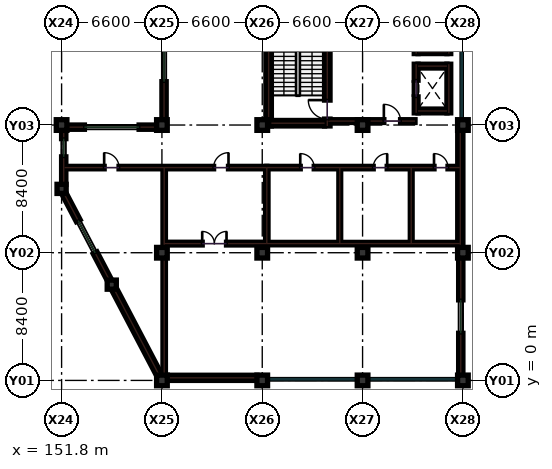
"""IFC4 building model, lengths in metres.
Left out: names, types, materials, properties, quantities, classifications, styles, units other than length and angle.
Written with IfcOpenShell. Run it as: python <this file> out.ifc"""

import sys

from ifc_helpers import new_model, si_unit, direction, frame, frame_2d, origin, origin_2d, place, context, subcontext, project, spatial, rectangle, extrude, element, fill, save


model = new_model("IFC4")
c1 = context("Model", 3, precision=1e-05, world=origin(), true_north=direction((0.0, 1.0)))
c2 = subcontext(c1, "Body", "Model", "MODEL_VIEW")
j1 = project(units=[si_unit("LENGTHUNIT", "METRE"), si_unit("PLANEANGLEUNIT", "RADIAN")], contexts=[c1])
p1 = place(None, origin())
s1 = spatial("IfcSite", under=j1, at=p1, CompositionType="ELEMENT")
p2 = place(p1, origin())
s2 = spatial("IfcBuilding", under=s1, at=p2, CompositionType="ELEMENT")
p3 = place(p2, frame((0.0, 0.0, 18.6)))
s3 = spatial("IfcBuildingStorey", under=s2, at=p3, CompositionType="ELEMENT", Elevation=18.6)
for number, where, z_axis, x_axis in (
    (1, (151.8, 16.8, 0.0), (0.0, 0.0, 1.0), (1.0, 0.0, 0.0)),
    (2, (158.4, 0.0, 0.0), (0.0, 0.0, 1.0), (1.0, 0.0, 0.0)),
    (3, (158.4, 8.4, 0.0), (0.0, 0.0, 1.0), (1.0, 0.0, 0.0)),
    (4, (158.4, 16.8, 0.0), (0.0, 0.0, 1.0), (1.0, 0.0, 0.0)),
    (5, (165.0, 0.0, 0.0), (0.0, 0.0, 1.0), (1.0, 0.0, 0.0)),
    (6, (165.0, 8.4, 0.0), (0.0, 0.0, 1.0), (1.0, 0.0, 0.0)),
    (7, (165.0, 16.8, 0.0), (0.0, 0.0, 1.0), (1.0, 0.0, 0.0)),
    (8, (171.6, 0.0, 0.0), (0.0, 0.0, 1.0), (1.0, 0.0, 0.0)),
    (9, (171.6, 8.4, 0.0), (0.0, 0.0, 1.0), (1.0, 0.0, 0.0)),
    (10, (171.6, 16.8, 0.0), (0.0, 0.0, 1.0), (1.0, 0.0, 0.0)),
    (11, (178.2, 0.0, 0.0), (0.0, 0.0, 1.0), (1.0, 0.0, 0.0)),
    (12, (178.2, 8.4, 0.0), (0.0, 0.0, 1.0), (1.0, 0.0, 0.0)),
    (13, (178.2, 16.8, 0.0), (0.0, 0.0, 1.0), (1.0, 0.0, 0.0)),
):
    element("IfcColumn", number, at=place(p3, frame(where, z_axis=z_axis, x_axis=x_axis)), inside=s3, PredefinedType="COLUMN", context=c2, shape_type="SweptSolid", body=[
        extrude(rectangle(XDim=0.7, YDim=0.7, at=origin_2d()), origin(), (0.0, 0.0, 1.0), 4.2),
    ])
for number, where, z_axis, x_axis in (
    (14, (151.8, 12.6, 0.0), (0.0, 0.0, 1.0), (1.0, 0.0, 0.0)),
    (15, (155.1, 6.3, 0.0), (0.0, 0.0, 1.0), (1.0, 0.0, 0.0)),
):
    element("IfcColumn", number, at=place(p3, frame(where, z_axis=z_axis, x_axis=x_axis)), inside=s3, PredefinedType="COLUMN", context=c2, shape_type="SweptSolid", body=[
        extrude(rectangle(XDim=0.6, YDim=0.6, at=origin_2d()), origin(), (0.0, 0.0, 1.0), 4.2),
    ])
p4 = place(p3, frame((165.3, 14.0, 0.0), z_axis=(0.0, 0.0, 1.0), x_axis=(1.0, 0.0, 0.0)))
e16 = element("IfcWall", 16, at=p4, inside=s3, PredefinedType="PARTITIONING", context=c2, shape_type="SweptSolid", body=[
    extrude(rectangle(XDim=12.7, YDim=0.16, at=frame_2d((6.35, 0.0))), origin(), (0.0, 0.0, 1.0), 3.19),
])
p5 = place(p4, frame((2.2, 0.0, 0.0)))
e17 = element("IfcOpeningElement", 17, at=p5, cuts=e16, PredefinedType="OPENING", context=c2, shape_type="SweptSolid", body=[
    extrude(rectangle(XDim=0.92, YDim=2.08, at=frame_2d((0.46, 1.04))), frame((0.0, 0.09, 0.0), z_axis=(0.0, -1.0, 0.0), x_axis=(1.0, 0.0, 0.0)), (0.0, 0.0, 1.0), 0.18),
])
p6 = place(p4, frame((7.0, 0.0, 0.0)))
e18 = element("IfcOpeningElement", 18, at=p6, cuts=e16, PredefinedType="OPENING", context=c2, shape_type="SweptSolid", body=[
    extrude(rectangle(XDim=0.92, YDim=2.08, at=frame_2d((0.46, 1.04))), frame((0.0, 0.09, 0.0), z_axis=(0.0, -1.0, 0.0), x_axis=(1.0, 0.0, 0.0)), (0.0, 0.0, 1.0), 0.18),
])
p7 = place(p4, frame((11.0, 0.0, 0.0)))
e19 = element("IfcOpeningElement", 19, at=p7, cuts=e16, PredefinedType="OPENING", context=c2, shape_type="SweptSolid", body=[
    extrude(rectangle(XDim=0.92, YDim=2.08, at=frame_2d((0.46, 1.04))), frame((0.0, 0.09, 0.0), z_axis=(0.0, -1.0, 0.0), x_axis=(1.0, 0.0, 0.0)), (0.0, 0.0, 1.0), 0.18),
])
p8 = place(p3, frame((165.3, 9.0, 0.0), z_axis=(0.0, 0.0, 1.0), x_axis=(1.0, 0.0, 0.0)))
e20 = element("IfcWall", 20, at=p8, inside=s3, PredefinedType="PARTITIONING", context=c2, shape_type="SweptSolid", body=[
    extrude(rectangle(XDim=12.7, YDim=0.16, at=frame_2d((6.35, 0.0))), origin(), (0.0, 0.0, 1.0), 3.19),
])
p9 = place(p3, frame((165.3, 9.0, 0.0), z_axis=(0.0, 0.0, 1.0), x_axis=(0.0, 1.0, 0.0)))
e21 = element("IfcWall", 21, at=p9, inside=s3, PredefinedType="PARTITIONING", context=c2, shape_type="SweptSolid", body=[
    extrude(rectangle(XDim=5.0, YDim=0.16, at=frame_2d((2.5, 0.0))), origin(), (0.0, 0.0, 1.0), 3.19),
])
for number, where, z_axis, x_axis in (
    (22, (170.1, 9.0, 0.0), (0.0, 0.0, 1.0), (0.0, 1.0, 0.0)),
    (23, (174.8, 9.0, 0.0), (0.0, 0.0, 1.0), (0.0, 1.0, 0.0)),
):
    element("IfcWall", number, at=place(p3, frame(where, z_axis=z_axis, x_axis=x_axis)), inside=s3, PredefinedType="PARTITIONING", context=c2, shape_type="SweptSolid", body=[
        extrude(rectangle(XDim=5.0, YDim=0.12, at=frame_2d((2.5, 0.0))), origin(), (0.0, 0.0, 1.0), 3.19),
    ])
p10 = place(p3, frame((158.55, 9.0, 0.0), z_axis=(0.0, 0.0, 1.0), x_axis=(1.0, 0.0, 0.0)))
e24 = element("IfcWall", 24, at=p10, inside=s3, PredefinedType="SOLIDWALL", context=c2, shape_type="SweptSolid", body=[
    extrude(rectangle(XDim=6.75, YDim=0.18, at=frame_2d((3.375, 0.0))), origin(), (0.0, 0.0, 1.0), 3.19),
])
p11 = place(p10, frame((2.5, 0.0, 0.0)))
e25 = element("IfcOpeningElement", 25, at=p11, cuts=e24, PredefinedType="OPENING", context=c2, shape_type="SweptSolid", body=[
    extrude(rectangle(XDim=1.6, YDim=2.2, at=frame_2d((0.8, 1.1))), frame((0.0, 0.1, 0.0), z_axis=(0.0, -1.0, 0.0), x_axis=(1.0, 0.0, 0.0)), (0.0, 0.0, 1.0), 0.2),
])
p12 = place(p3, frame((158.55, 0.25, 0.0), z_axis=(0.0, 0.0, 1.0), x_axis=(0.0, 1.0, 0.0)))
e26 = element("IfcWall", 26, at=p12, inside=s3, PredefinedType="PARTITIONING", context=c2, shape_type="SweptSolid", body=[
    extrude(rectangle(XDim=7.7, YDim=0.16, at=frame_2d((3.85, 0.0))), origin(), (0.0, 0.0, 1.0), 3.19),
])
p13 = place(p3, frame((158.55, 8.85, 0.0), z_axis=(0.0, 0.0, 1.0), x_axis=(0.0, 1.0, 0.0)))
e27 = element("IfcWall", 27, at=p13, inside=s3, PredefinedType="PARTITIONING", context=c2, shape_type="SweptSolid", body=[
    extrude(rectangle(XDim=5.15, YDim=0.16, at=frame_2d((2.575, 0.0))), origin(), (0.0, 0.0, 1.0), 3.19),
])
p14 = place(p3, frame((152.0, 14.0, 0.0), z_axis=(0.0, 0.0, 1.0), x_axis=(1.0, 0.0, 0.0)))
e28 = element("IfcWall", 28, at=p14, inside=s3, PredefinedType="PARTITIONING", context=c2, shape_type="SweptSolid", body=[
    extrude(rectangle(XDim=13.3, YDim=0.16, at=frame_2d((6.65, 0.0))), origin(), (0.0, 0.0, 1.0), 3.19),
])
p15 = place(p14, frame((2.6, 0.0, 0.0)))
e29 = element("IfcOpeningElement", 29, at=p15, cuts=e28, PredefinedType="OPENING", context=c2, shape_type="SweptSolid", body=[
    extrude(rectangle(XDim=0.98, YDim=2.12, at=frame_2d((0.49, 1.06))), frame((0.0, 0.09, 0.0), z_axis=(0.0, -1.0, 0.0), x_axis=(1.0, 0.0, 0.0)), (0.0, 0.0, 1.0), 0.18),
])
p16 = place(p14, frame((9.8, 0.0, 0.0)))
e30 = element("IfcOpeningElement", 30, at=p16, cuts=e28, PredefinedType="OPENING", context=c2, shape_type="SweptSolid", body=[
    extrude(rectangle(XDim=0.98, YDim=2.12, at=frame_2d((0.49, 1.06))), frame((0.0, 0.09, 0.0), z_axis=(0.0, -1.0, 0.0), x_axis=(1.0, 0.0, 0.0)), (0.0, 0.0, 1.0), 0.18),
])
p17 = place(p3, frame((158.055, 16.66, 0.0), z_axis=(0.0, 0.0, 1.0), x_axis=(-1.0, 0.0, 0.0)))
e31 = element("IfcWall", 31, at=p17, inside=s3, PredefinedType="SOLIDWALL", context=c2, shape_type="SweptSolid", body=[
    extrude(rectangle(XDim=5.91, YDim=0.28, at=frame_2d((2.955, 0.0))), origin(), (0.0, 0.0, 1.0), 3.325),
])
p18 = place(p17, frame((1.155, 0.0, 0.95)))
e32 = element("IfcOpeningElement", 32, at=p18, cuts=e31, PredefinedType="OPENING", context=c2, shape_type="SweptSolid", body=[
    extrude(rectangle(XDim=3.6, YDim=2.0, at=frame_2d((1.8, 1.0))), frame((0.0, 0.15, 0.0), z_axis=(0.0, -1.0, 0.0), x_axis=(1.0, 0.0, 0.0)), (0.0, 0.0, 1.0), 0.3),
])
p19 = place(p3, frame((158.745, 0.17, 0.0), z_axis=(0.0, 0.0, 1.0), x_axis=(1.0, 0.0, 0.0)))
e33 = element("IfcWall", 33, at=p19, inside=s3, PredefinedType="SHEAR", context=c2, shape_type="SweptSolid", body=[
    extrude(rectangle(XDim=5.91, YDim=0.34, at=frame_2d((2.955, 0.0))), origin(), (0.0, 0.0, 1.0), 3.94),
])
p20 = place(p3, frame((158.54, 24.855, 0.0), z_axis=(0.0, 0.0, 1.0), x_axis=(0.0, -1.0, 0.0)))
e34 = element("IfcWall", 34, at=p20, inside=s3, PredefinedType="SOLIDWALL", context=c2, shape_type="SweptSolid", body=[
    extrude(rectangle(XDim=7.71, YDim=0.28, at=frame_2d((3.855, 0.0))), origin(), (0.0, 0.0, 1.0), 3.325),
])
p21 = place(p20, frame((2.505, 0.0, 0.95)))
e35 = element("IfcOpeningElement", 35, at=p21, cuts=e34, PredefinedType="OPENING", context=c2, shape_type="SweptSolid", body=[
    extrude(rectangle(XDim=2.7, YDim=2.05, at=frame_2d((1.35, 1.025))), frame((0.0, 0.15, 0.0), z_axis=(0.0, -1.0, 0.0), x_axis=(1.0, 0.0, 0.0)), (0.0, 0.0, 1.0), 0.3),
])
p22 = place(p3, frame((178.06, 0.345, 0.0), z_axis=(0.0, 0.0, 1.0), x_axis=(0.0, 1.0, 0.0)))
e36 = element("IfcWall", 36, at=p22, inside=s3, PredefinedType="SOLIDWALL", context=c2, shape_type="SweptSolid", body=[
    extrude(rectangle(XDim=7.71, YDim=0.28, at=frame_2d((3.855, 0.0))), origin(), (0.0, 0.0, 1.0), 3.325),
])
p23 = place(p22, frame((2.755, 0.0, 0.95)))
e37 = element("IfcOpeningElement", 37, at=p23, cuts=e36, PredefinedType="OPENING", context=c2, shape_type="SweptSolid", body=[
    extrude(rectangle(XDim=2.2, YDim=1.85, at=frame_2d((1.1, 0.925))), frame((0.0, 0.15, 0.0), z_axis=(0.0, -1.0, 0.0), x_axis=(1.0, 0.0, 0.0)), (0.0, 0.0, 1.0), 0.3),
])
p24 = place(p3, frame((178.03, 8.745, 0.0), z_axis=(0.0, 0.0, 1.0), x_axis=(0.0, 1.0, 0.0)))
e38 = element("IfcWall", 38, at=p24, inside=s3, PredefinedType="SHEAR", context=c2, shape_type="SweptSolid", body=[
    extrude(rectangle(XDim=7.71, YDim=0.34, at=frame_2d((3.855, 0.0))), origin(), (0.0, 0.0, 1.0), 3.94),
])
p25 = place(p3, frame((151.94, 16.455, 0.0), z_axis=(0.0, 0.0, 1.0), x_axis=(0.0, -1.0, 0.0)))
e39 = element("IfcWall", 39, at=p25, inside=s3, PredefinedType="SOLIDWALL", context=c2, shape_type="SweptSolid", body=[
    extrude(rectangle(XDim=3.56, YDim=0.28, at=frame_2d((1.78, 0.0))), origin(), (0.0, 0.0, 1.0), 3.325),
])
p26 = place(p25, frame((0.55, 0.0, 0.95)))
e40 = element("IfcOpeningElement", 40, at=p26, cuts=e39, PredefinedType="OPENING", context=c2, shape_type="SweptSolid", body=[
    extrude(rectangle(XDim=1.2, YDim=1.5, at=frame_2d((0.6, 0.75))), frame((0.0, 0.15, 0.0), z_axis=(0.0, -1.0, 0.0), x_axis=(1.0, 0.0, 0.0)), (0.0, 0.0, 1.0), 0.3),
])
p27 = place(p3, frame((151.95, 12.31, 0.0), z_axis=(0.0, 0.0, 1.0), x_axis=(0.464471613901, -0.885588007981, 0.0)))
e41 = element("IfcWall", 41, at=p27, inside=s3, PredefinedType="SOLIDWALL", context=c2, shape_type="SweptSolid", body=[
    extrude(rectangle(XDim=6.459, YDim=0.28, at=frame_2d((3.229, 0.0))), origin(), (0.0, 0.0, 1.0), 3.325),
])
p28 = place(p27, frame((2.03, 0.0, 0.95)))
e42 = element("IfcOpeningElement", 42, at=p28, cuts=e41, PredefinedType="OPENING", context=c2, shape_type="SweptSolid", body=[
    extrude(rectangle(XDim=2.4, YDim=1.6, at=frame_2d((1.2, 0.8))), frame((0.0, 0.15, 0.0), z_axis=(0.0, -1.0, 0.0), x_axis=(1.0, 0.0, 0.0)), (0.0, 0.0, 1.0), 0.3),
])
p29 = place(p3, frame((155.25, 6.01, 0.0), z_axis=(0.0, 0.0, 1.0), x_axis=(0.464471613901, -0.885588007981, 0.0)))
e43 = element("IfcWall", 43, at=p29, inside=s3, PredefinedType="SHEAR", context=c2, shape_type="SweptSolid", body=[
    extrude(rectangle(XDim=6.459, YDim=0.34, at=frame_2d((3.229, 0.0))), origin(), (0.0, 0.0, 1.0), 3.94),
])
p30 = place(p3, frame((165.42, 16.74, 0.0), z_axis=(0.0, 0.0, 1.0), x_axis=(0.0, 1.0, 0.0)))
e44 = element("IfcWall", 44, at=p30, inside=s3, PredefinedType="SHEAR", context=c2, shape_type="SweptSolid", body=[
    extrude(rectangle(XDim=8.37, YDim=0.36, at=frame_2d((4.185, 0.0))), origin(), (0.0, 0.0, 1.0), 3.94),
])
p31 = place(p3, frame((169.28, 16.74, 0.0), z_axis=(0.0, 0.0, 1.0), x_axis=(0.0, 1.0, 0.0)))
e45 = element("IfcWall", 45, at=p31, inside=s3, PredefinedType="SHEAR", context=c2, shape_type="SweptSolid", body=[
    extrude(rectangle(XDim=8.37, YDim=0.36, at=frame_2d((4.185, 0.0))), origin(), (0.0, 0.0, 1.0), 3.94),
])
p32 = place(p31, frame((0.45, 0.0, 0.0)))
e46 = element("IfcOpeningElement", 46, at=p32, cuts=e45, PredefinedType="OPENING", context=c2, shape_type="SweptSolid", body=[
    extrude(rectangle(XDim=1.25, YDim=2.15, at=frame_2d((0.625, 1.075))), frame((0.0, 0.19, 0.0), z_axis=(0.0, -1.0, 0.0), x_axis=(1.0, 0.0, 0.0)), (0.0, 0.0, 1.0), 0.38),
])
p33 = place(p3, frame((165.6, 16.92, 0.0), z_axis=(0.0, 0.0, 1.0), x_axis=(1.0, 0.0, 0.0)))
e47 = element("IfcWall", 47, at=p33, inside=s3, PredefinedType="SHEAR", context=c2, shape_type="SweptSolid", body=[
    extrude(rectangle(XDim=3.5, YDim=0.36, at=frame_2d((1.75, 0.0))), origin(), (0.0, 0.0, 1.0), 3.94),
])
p34 = place(p3, frame((175.125, 17.6, 0.0), z_axis=(0.0, 0.0, 1.0), x_axis=(0.0, 1.0, 0.0)))
e48 = element("IfcWall", 48, at=p34, inside=s3, PredefinedType="SHEAR", context=c2, shape_type="SweptSolid", body=[
    extrude(rectangle(XDim=3.2, YDim=0.25, at=frame_2d((1.6, 0.0))), origin(), (0.0, 0.0, 1.0), 3.94),
])
p35 = place(p34, frame((1.05, 0.0, 0.0)))
e49 = element("IfcOpeningElement", 49, at=p35, cuts=e48, PredefinedType="OPENING", context=c2, shape_type="SweptSolid", body=[
    extrude(rectangle(XDim=1.1, YDim=2.15, at=frame_2d((0.55, 1.075))), frame((0.0, 0.135, 0.0), z_axis=(0.0, -1.0, 0.0), x_axis=(1.0, 0.0, 0.0)), (0.0, 0.0, 1.0), 0.27),
])
p36 = place(p3, frame((177.275, 17.6, 0.0), z_axis=(0.0, 0.0, 1.0), x_axis=(0.0, 1.0, 0.0)))
e50 = element("IfcWall", 50, at=p36, inside=s3, PredefinedType="SHEAR", context=c2, shape_type="SweptSolid", body=[
    extrude(rectangle(XDim=3.2, YDim=0.25, at=frame_2d((1.6, 0.0))), origin(), (0.0, 0.0, 1.0), 3.94),
])
for number, where, z_axis, x_axis in (
    (51, (175.25, 17.725, 0.0), (0.0, 0.0, 1.0), (1.0, 0.0, 0.0)),
    (52, (175.25, 20.675, 0.0), (0.0, 0.0, 1.0), (1.0, 0.0, 0.0)),
):
    element("IfcWall", number, at=place(p3, frame(where, z_axis=z_axis, x_axis=x_axis)), inside=s3, PredefinedType="SHEAR", context=c2, shape_type="SweptSolid", body=[
        extrude(rectangle(XDim=1.9, YDim=0.25, at=frame_2d((0.95, 0.0))), origin(), (0.0, 0.0, 1.0), 3.94),
    ])
p37 = place(p3, frame((175.125, 21.5, 0.0), z_axis=(0.0, 0.0, 1.0), x_axis=(0.0, 1.0, 0.0)))
e53 = element("IfcWall", 53, at=p37, inside=s3, PredefinedType="SHEAR", context=c2, shape_type="SweptSolid", body=[
    extrude(rectangle(XDim=3.2, YDim=0.25, at=frame_2d((1.6, 0.0))), origin(), (0.0, 0.0, 1.0), 3.94),
])
p38 = place(p37, frame((1.05, 0.0, 0.0)))
e54 = element("IfcOpeningElement", 54, at=p38, cuts=e53, PredefinedType="OPENING", context=c2, shape_type="SweptSolid", body=[
    extrude(rectangle(XDim=1.1, YDim=2.15, at=frame_2d((0.55, 1.075))), frame((0.0, 0.135, 0.0), z_axis=(0.0, -1.0, 0.0), x_axis=(1.0, 0.0, 0.0)), (0.0, 0.0, 1.0), 0.27),
])
p39 = place(p3, frame((177.275, 21.5, 0.0), z_axis=(0.0, 0.0, 1.0), x_axis=(0.0, 1.0, 0.0)))
e55 = element("IfcWall", 55, at=p39, inside=s3, PredefinedType="SHEAR", context=c2, shape_type="SweptSolid", body=[
    extrude(rectangle(XDim=3.2, YDim=0.25, at=frame_2d((1.6, 0.0))), origin(), (0.0, 0.0, 1.0), 3.94),
])
p40 = place(p3, frame((175.25, 21.625, 0.0), z_axis=(0.0, 0.0, 1.0), x_axis=(1.0, 0.0, 0.0)))
e56 = element("IfcWall", 56, at=p40, inside=s3, PredefinedType="SHEAR", context=c2, shape_type="SweptSolid", body=[
    extrude(rectangle(XDim=1.9, YDim=0.25, at=frame_2d((0.95, 0.0))), origin(), (0.0, 0.0, 1.0), 3.94),
])
p41 = place(p3, frame((169.35, 17.06, 0.0), z_axis=(0.0, 0.0, 1.0), x_axis=(1.0, 0.0, 0.0)))
e57 = element("IfcWall", 57, at=p41, inside=s3, PredefinedType="SOLIDWALL", context=c2, shape_type="SweptSolid", body=[
    extrude(rectangle(XDim=5.7, YDim=0.18, at=frame_2d((2.85, 0.0))), origin(), (0.0, 0.0, 1.0), 3.275),
])
p42 = place(p41, frame((3.65, 0.0, 0.0)))
e58 = element("IfcOpeningElement", 58, at=p42, cuts=e57, PredefinedType="OPENING", context=c2, shape_type="SweptSolid", body=[
    extrude(rectangle(XDim=1.1, YDim=2.15, at=frame_2d((0.55, 1.075))), frame((0.0, 0.1, 0.0), z_axis=(0.0, -1.0, 0.0), x_axis=(1.0, 0.0, 0.0)), (0.0, 0.0, 1.0), 0.2),
])
p43 = place(p5, origin())
e59 = element("IfcDoor", 59, at=p43, inside=s3, OperationType="SINGLE_SWING_LEFT", PredefinedType="DOOR", context=c2, shape_type="SweptSolid", body=[
    extrude(rectangle(XDim=0.92, YDim=2.08, at=frame_2d((0.46, 1.04))), frame((0.0, 0.025, 0.0), z_axis=(0.0, -1.0, 0.0), x_axis=(1.0, 0.0, 0.0)), (0.0, 0.0, 1.0), 0.05),
])
fill(e17, e59)
p44 = place(p6, origin())
e60 = element("IfcDoor", 60, at=p44, inside=s3, OperationType="SINGLE_SWING_RIGHT", PredefinedType="DOOR", context=c2, shape_type="SweptSolid", body=[
    extrude(rectangle(XDim=0.92, YDim=2.08, at=frame_2d((0.46, 1.04))), frame((0.0, 0.025, 0.0), z_axis=(0.0, -1.0, 0.0), x_axis=(1.0, 0.0, 0.0)), (0.0, 0.0, 1.0), 0.05),
])
fill(e18, e60)
p45 = place(p7, origin())
e61 = element("IfcDoor", 61, at=p45, inside=s3, OperationType="SINGLE_SWING_LEFT", PredefinedType="DOOR", context=c2, shape_type="SweptSolid", body=[
    extrude(rectangle(XDim=0.92, YDim=2.08, at=frame_2d((0.46, 1.04))), frame((0.0, 0.025, 0.0), z_axis=(0.0, -1.0, 0.0), x_axis=(1.0, 0.0, 0.0)), (0.0, 0.0, 1.0), 0.05),
])
fill(e19, e61)
p46 = place(p11, origin())
e62 = element("IfcDoor", 62, at=p46, inside=s3, OperationType="DOUBLE_DOOR_SINGLE_SWING", PredefinedType="DOOR", context=c2, shape_type="SweptSolid", body=[
    extrude(rectangle(XDim=1.6, YDim=2.2, at=frame_2d((0.8, 1.1))), frame((0.0, 0.025, 0.0), z_axis=(0.0, -1.0, 0.0), x_axis=(1.0, 0.0, 0.0)), (0.0, 0.0, 1.0), 0.05),
])
fill(e25, e62)
p47 = place(p15, origin())
e63 = element("IfcDoor", 63, at=p47, inside=s3, OperationType="SINGLE_SWING_LEFT", PredefinedType="DOOR", context=c2, shape_type="SweptSolid", body=[
    extrude(rectangle(XDim=0.98, YDim=2.12, at=frame_2d((0.49, 1.06))), frame((0.0, 0.025, 0.0), z_axis=(0.0, -1.0, 0.0), x_axis=(1.0, 0.0, 0.0)), (0.0, 0.0, 1.0), 0.05),
])
fill(e29, e63)
p48 = place(p16, origin())
e64 = element("IfcDoor", 64, at=p48, inside=s3, OperationType="SINGLE_SWING_RIGHT", PredefinedType="DOOR", context=c2, shape_type="SweptSolid", body=[
    extrude(rectangle(XDim=0.98, YDim=2.12, at=frame_2d((0.49, 1.06))), frame((0.0, 0.025, 0.0), z_axis=(0.0, -1.0, 0.0), x_axis=(1.0, 0.0, 0.0)), (0.0, 0.0, 1.0), 0.05),
])
fill(e30, e64)
p49 = place(p18, origin())
e65 = element("IfcWindow", 65, at=p49, inside=s3, PartitioningType="SINGLE_PANEL", PredefinedType="WINDOW", context=c2, shape_type="SweptSolid", body=[
    extrude(rectangle(XDim=3.6, YDim=2.0, at=frame_2d((1.8, 1.0))), frame((0.0, 0.03, 0.0), z_axis=(0.0, -1.0, 0.0), x_axis=(1.0, 0.0, 0.0)), (0.0, 0.0, 1.0), 0.06),
])
fill(e32, e65)
p50 = place(p21, origin())
e66 = element("IfcWindow", 66, at=p50, inside=s3, PartitioningType="SINGLE_PANEL", PredefinedType="WINDOW", context=c2, shape_type="SweptSolid", body=[
    extrude(rectangle(XDim=2.7, YDim=2.05, at=frame_2d((1.35, 1.025))), frame((0.0, 0.03, 0.0), z_axis=(0.0, -1.0, 0.0), x_axis=(1.0, 0.0, 0.0)), (0.0, 0.0, 1.0), 0.06),
])
fill(e35, e66)
p51 = place(p23, origin())
e67 = element("IfcWindow", 67, at=p51, inside=s3, PartitioningType="SINGLE_PANEL", PredefinedType="WINDOW", context=c2, shape_type="SweptSolid", body=[
    extrude(rectangle(XDim=2.2, YDim=1.85, at=frame_2d((1.1, 0.925))), frame((0.0, 0.03, 0.0), z_axis=(0.0, -1.0, 0.0), x_axis=(1.0, 0.0, 0.0)), (0.0, 0.0, 1.0), 0.06),
])
fill(e37, e67)
p52 = place(p26, origin())
e68 = element("IfcWindow", 68, at=p52, inside=s3, PartitioningType="SINGLE_PANEL", PredefinedType="WINDOW", context=c2, shape_type="SweptSolid", body=[
    extrude(rectangle(XDim=1.2, YDim=1.5, at=frame_2d((0.6, 0.75))), frame((0.0, 0.03, 0.0), z_axis=(0.0, -1.0, 0.0), x_axis=(1.0, 0.0, 0.0)), (0.0, 0.0, 1.0), 0.06),
])
fill(e40, e68)
p53 = place(p28, origin())
e69 = element("IfcWindow", 69, at=p53, inside=s3, PartitioningType="SINGLE_PANEL", PredefinedType="WINDOW", context=c2, shape_type="SweptSolid", body=[
    extrude(rectangle(XDim=2.4, YDim=1.6, at=frame_2d((1.2, 0.8))), frame((0.0, 0.03, 0.0), z_axis=(0.0, -1.0, 0.0), x_axis=(1.0, 0.0, 0.0)), (0.0, 0.0, 1.0), 0.06),
])
fill(e42, e69)
p54 = place(p32, origin())
e70 = element("IfcDoor", 70, at=p54, inside=s3, OperationType="SINGLE_SWING_RIGHT", PredefinedType="DOOR", context=c2, shape_type="SweptSolid", body=[
    extrude(rectangle(XDim=1.25, YDim=2.15, at=frame_2d((0.625, 1.075))), frame((0.0, 0.025, 0.0), z_axis=(0.0, -1.0, 0.0), x_axis=(1.0, 0.0, 0.0)), (0.0, 0.0, 1.0), 0.05),
])
fill(e46, e70)
p55 = place(p35, origin())
e71 = element("IfcDoor", 71, at=p55, inside=s3, OperationType="SLIDING_TO_LEFT", PredefinedType="DOOR", context=c2, shape_type="SweptSolid", body=[
    extrude(rectangle(XDim=1.1, YDim=2.15, at=frame_2d((0.55, 1.075))), frame((0.0, 0.025, 0.0), z_axis=(0.0, -1.0, 0.0), x_axis=(1.0, 0.0, 0.0)), (0.0, 0.0, 1.0), 0.05),
])
fill(e49, e71)
p56 = place(p42, origin())
e72 = element("IfcDoor", 72, at=p56, inside=s3, OperationType="SINGLE_SWING_LEFT", PredefinedType="DOOR", context=c2, shape_type="SweptSolid", body=[
    extrude(rectangle(XDim=1.1, YDim=2.15, at=frame_2d((0.55, 1.075))), frame((0.0, 0.025, 0.0), z_axis=(0.0, -1.0, 0.0), x_axis=(1.0, 0.0, 0.0)), (0.0, 0.0, 1.0), 0.05),
])
fill(e58, e72)
save(model, sys.argv[1])
